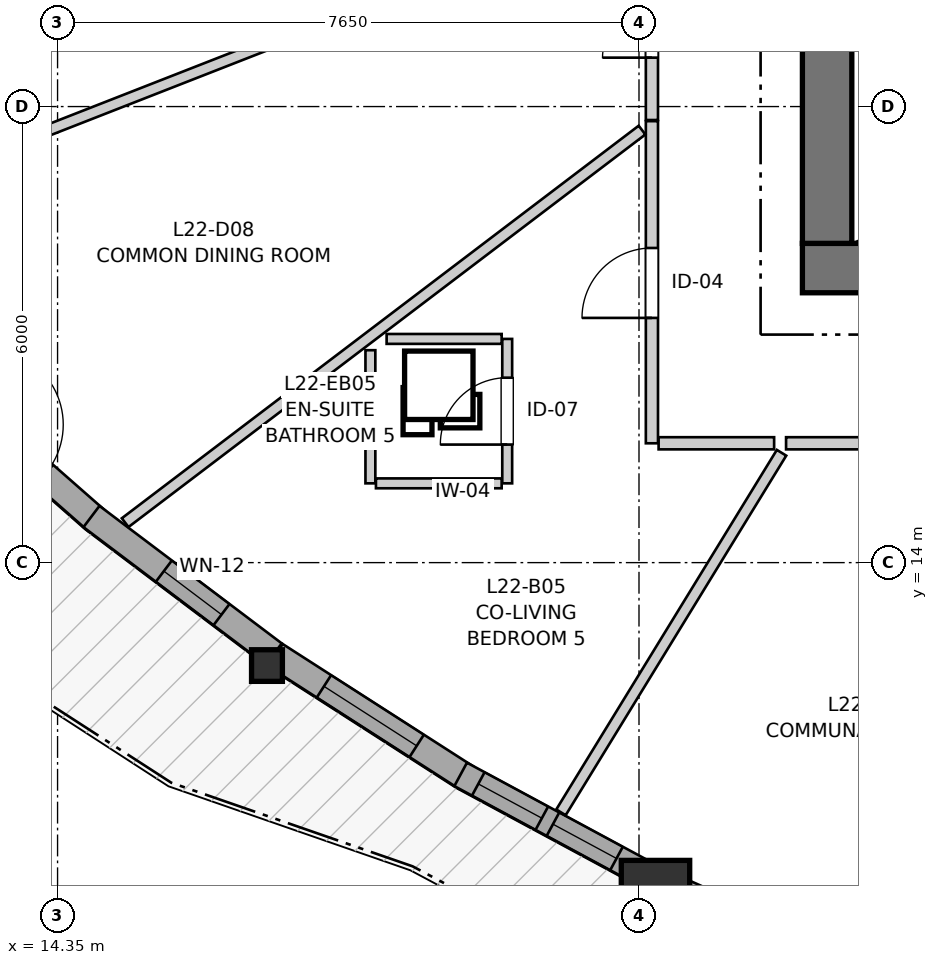
"""IFC4 building model, lengths in metres.
Left out: names, types, materials, properties, quantities, classifications, styles, units other than length and angle.
Written with IfcOpenShell. Run it as: python <this file> out.ifc"""

import sys

from ifc_helpers import new_model, si_unit, direction, frame, frame_2d, origin, origin_2d, place, context, subcontext, project, spatial, rectangle, i_section, extrude, source, transform, mapped, element, fill, save


model = new_model("IFC4")
c1 = context("Model", 3, precision=1e-05, world=origin(), true_north=direction((0.0, 1.0)))
c2 = subcontext(c1, "Body", "Model", "MODEL_VIEW")
j1 = project(units=[si_unit("LENGTHUNIT", "METRE"), si_unit("PLANEANGLEUNIT", "RADIAN")], contexts=[c1])
p1 = place(None, origin())
s1 = spatial("IfcSite", under=j1, at=p1, CompositionType="ELEMENT")
p2 = place(p1, origin())
s2 = spatial("IfcBuilding", under=s1, at=p2, CompositionType="ELEMENT")
p3 = place(p2, frame((0.0, 0.0, 76.8)))
s3 = spatial("IfcBuildingStorey", under=s2, at=p3, CompositionType="ELEMENT", Elevation=76.8)
p4 = place(p3, frame((24.15, 17.875, 0.0), z_axis=(0.0, 0.0, 1.0), x_axis=(1.0, 0.0, 0.0)))
e1 = element("IfcWall", 1, at=p4, inside=s3, PredefinedType="SHEAR", context=c2, shape_type="SweptSolid", body=[
    extrude(rectangle(XDim=12.4, YDim=0.65, at=frame_2d((6.2, 0.0))), origin(), (0.0, 0.0, 1.0), 2.935),
])
p5 = place(p3, frame((24.475, 33.8, 0.0), z_axis=(0.0, 0.0, 1.0), x_axis=(0.0, -1.0, 0.0)))
e2 = element("IfcWall", 2, at=p5, inside=s3, PredefinedType="SHEAR", context=c2, shape_type="SweptSolid", body=[
    extrude(rectangle(XDim=15.6, YDim=0.65, at=frame_2d((7.8, 0.0))), origin(), (0.0, 0.0, 1.0), 2.935),
])
p6 = place(p5, frame((7.05, 0.0, 0.0)))
e3 = element("IfcOpeningElement", 3, at=p6, cuts=e2, PredefinedType="OPENING", context=c2, shape_type="SweptSolid", body=[
    extrude(rectangle(XDim=1.5, YDim=2.15, at=frame_2d((0.75, 1.075))), frame((0.0, 0.335, 0.0), z_axis=(0.0, -1.0, 0.0), x_axis=(1.0, 0.0, 0.0)), (0.0, 0.0, 1.0), 0.67),
])
p7 = place(p5, frame((3.52, 0.0, 0.0)))
e4 = element("IfcOpeningElement", 4, at=p7, cuts=e2, PredefinedType="OPENING", context=c2, shape_type="SweptSolid", body=[
    extrude(rectangle(XDim=0.86, YDim=2.05, at=frame_2d((0.43, 1.025))), frame((0.0, 0.335, 0.0), z_axis=(0.0, -1.0, 0.0), x_axis=(1.0, 0.0, 0.0)), (0.0, 0.0, 1.0), 0.67),
])
p8 = place(p5, frame((11.22, 0.0, 0.0)))
e5 = element("IfcOpeningElement", 5, at=p8, cuts=e2, PredefinedType="OPENING", context=c2, shape_type="SweptSolid", body=[
    extrude(rectangle(XDim=0.86, YDim=2.05, at=frame_2d((0.43, 1.025))), frame((0.0, 0.335, 0.0), z_axis=(0.0, -1.0, 0.0), x_axis=(1.0, 0.0, 0.0)), (0.0, 0.0, 1.0), 0.67),
])
m1 = source(origin(), c2, "Body", "SweptSolid", [
    extrude(i_section(OverallWidth=0.406, OverallDepth=0.416, WebThickness=0.027, FlangeThickness=0.044, FilletRadius=0.015, at=origin_2d()), origin(), (0.0, 0.0, 1.0), 2.935),
])
p9 = place(p3, frame((17.105, 12.646, 0.0), z_axis=(0.0, 0.0, 1.0), x_axis=(1.0, 0.0, 0.0)))
e6 = element("IfcColumn", 6, at=p9, inside=s3, PredefinedType="PILASTER", context=c2, shape_type="MappedRepresentation", body=[
    mapped(m1, transform((0.0, 0.0, 0.0), x_axis=(1.0, 0.0, 0.0), y_axis=(0.0, 1.0, 0.0), z_axis=(0.0, 0.0, 1.0), scale=1.0)),
])
m2 = source(origin(), c2, "Body", "SweptSolid", [
    extrude(rectangle(XDim=0.9, YDim=0.9, at=origin_2d()), origin(), (0.0, 0.0, 1.0), 2.935),
])
p10 = place(p3, frame((22.217, 9.633, 0.0), z_axis=(0.0, 0.0, 1.0), x_axis=(1.0, 0.0, 0.0)))
e7 = element("IfcColumn", 7, at=p10, inside=s3, PredefinedType="COLUMN", context=c2, shape_type="MappedRepresentation", body=[
    mapped(m2, transform((0.0, 0.0, 0.0), x_axis=(1.0, 0.0, 0.0), y_axis=(0.0, 1.0, 0.0), z_axis=(0.0, 0.0, 1.0), scale=1.0)),
])
p11 = place(p3, frame((12.736, 16.419, 0.0), z_axis=(0.0, 0.0, 1.0), x_axis=(0.751507962483, -0.659724019818, 0.0)))
e8 = element("IfcWall", 8, at=p11, inside=s3, PredefinedType="SOLIDWALL", context=c2, shape_type="SweptSolid", body=[
    extrude(rectangle(XDim=2.833, YDim=0.35, at=frame_2d((1.417, 0.0))), origin(), (0.0, 0.0, 1.0), 2.465),
])
p12 = place(p11, frame((0.917, 0.0, 0.0)))
e9 = element("IfcOpeningElement", 9, at=p12, cuts=e8, PredefinedType="OPENING", context=c2, shape_type="SweptSolid", body=[
    extrude(rectangle(XDim=1.0, YDim=2.1, at=frame_2d((0.5, 1.05))), frame((0.0, 0.185, 0.0), z_axis=(0.0, -1.0, 0.0), x_axis=(1.0, 0.0, 0.0)), (0.0, 0.0, 1.0), 0.37),
])
p13 = place(p3, frame((14.796, 14.606, 0.0), z_axis=(0.0, 0.0, 1.0), x_axis=(0.79839776153, -0.602130396496, 0.0)))
e10 = element("IfcWall", 10, at=p13, inside=s3, PredefinedType="SOLIDWALL", context=c2, shape_type="SweptSolid", body=[
    extrude(rectangle(XDim=3.004, YDim=0.35, at=frame_2d((1.502, 0.0))), origin(), (0.0, 0.0, 1.0), 2.465),
])
p14 = place(p13, frame((1.193, 0.0, 0.82)))
e11 = element("IfcOpeningElement", 11, at=p14, cuts=e10, PredefinedType="OPENING", context=c2, shape_type="SweptSolid", body=[
    extrude(rectangle(XDim=0.95, YDim=1.35, at=frame_2d((0.475, 0.675))), frame((0.0, 0.185, 0.0), z_axis=(0.0, -1.0, 0.0), x_axis=(1.0, 0.0, 0.0)), (0.0, 0.0, 1.0), 0.37),
])
p15 = place(p3, frame((17.217, 12.782, 0.0), z_axis=(0.0, 0.0, 1.0), x_axis=(0.841568610443, -0.540150232729, 0.0)))
e12 = element("IfcWall", 12, at=p15, inside=s3, PredefinedType="SOLIDWALL", context=c2, shape_type="SweptSolid", body=[
    extrude(rectangle(XDim=2.987, YDim=0.35, at=frame_2d((1.494, 0.0))), origin(), (0.0, 0.0, 1.0), 2.465),
])
p16 = place(p15, frame((0.759, 0.0, 0.82)))
e13 = element("IfcOpeningElement", 13, at=p16, cuts=e12, PredefinedType="OPENING", context=c2, shape_type="SweptSolid", body=[
    extrude(rectangle(XDim=1.45, YDim=1.25, at=frame_2d((0.725, 0.625))), frame((0.0, 0.185, 0.0), z_axis=(0.0, -1.0, 0.0), x_axis=(1.0, 0.0, 0.0)), (0.0, 0.0, 1.0), 0.37),
])
p17 = place(p3, frame((19.654, 11.214, 0.0), z_axis=(0.0, 0.0, 1.0), x_axis=(0.880112978449, -0.474764304857, 0.0)))
e14 = element("IfcWall", 14, at=p17, inside=s3, PredefinedType="SOLIDWALL", context=c2, shape_type="SweptSolid", body=[
    extrude(rectangle(XDim=2.782, YDim=0.35, at=frame_2d((1.391, 0.0))), origin(), (0.0, 0.0, 1.0), 2.465),
])
p18 = place(p17, frame((0.264, 0.0, 0.82)))
e15 = element("IfcOpeningElement", 15, at=p18, cuts=e14, PredefinedType="OPENING", context=c2, shape_type="SweptSolid", body=[
    extrude(rectangle(XDim=0.95, YDim=1.35, at=frame_2d((0.475, 0.675))), frame((0.0, 0.185, 0.0), z_axis=(0.0, -1.0, 0.0), x_axis=(1.0, 0.0, 0.0)), (0.0, 0.0, 1.0), 0.37),
])
p19 = place(p17, frame((1.38, 0.0, 0.82)))
e16 = element("IfcOpeningElement", 16, at=p19, cuts=e14, PredefinedType="OPENING", context=c2, shape_type="SweptSolid", body=[
    extrude(rectangle(XDim=0.95, YDim=1.35, at=frame_2d((0.475, 0.675))), frame((0.0, 0.185, 0.0), z_axis=(0.0, -1.0, 0.0), x_axis=(1.0, 0.0, 0.0)), (0.0, 0.0, 1.0), 0.37),
])
p20 = place(p3, frame((22.494, 9.701, 0.0), z_axis=(0.0, 0.0, 1.0), x_axis=(0.913444316629, -0.406963733542, 0.0)))
e17 = element("IfcWall", 17, at=p20, inside=s3, PredefinedType="SOLIDWALL", context=c2, shape_type="SweptSolid", body=[
    extrude(rectangle(XDim=2.799, YDim=0.35, at=frame_2d((1.399, 0.0))), origin(), (0.0, 0.0, 1.0), 2.465),
])
p21 = place(p20, frame((0.669, 0.0, 0.82)))
e18 = element("IfcOpeningElement", 18, at=p21, cuts=e17, PredefinedType="OPENING", context=c2, shape_type="SweptSolid", body=[
    extrude(rectangle(XDim=1.45, YDim=1.25, at=frame_2d((0.725, 0.625))), frame((0.0, 0.185, 0.0), z_axis=(0.0, -1.0, 0.0), x_axis=(1.0, 0.0, 0.0)), (0.0, 0.0, 1.0), 0.37),
])
p22 = place(p3, frame((28.359, 15.57, 0.0), z_axis=(0.0, 0.0, 1.0), x_axis=(-1.0, 0.0, 0.0)))
e19 = element("IfcWall", 19, at=p22, inside=s3, PredefinedType="PARTITIONING", context=c2, shape_type="SweptSolid", body=[
    extrude(rectangle(XDim=4.424, YDim=0.16, at=frame_2d((2.212, 0.0))), origin(), (0.0, 0.0, 1.0), 2.935),
])
p23 = place(p22, frame((1.561, 0.0, 0.0)))
e20 = element("IfcOpeningElement", 20, at=p23, cuts=e19, PredefinedType="OPENING", context=c2, shape_type="SweptSolid", body=[
    extrude(rectangle(XDim=1.3, YDim=2.1, at=frame_2d((0.65, 1.05))), frame((0.0, 0.09, 0.0), z_axis=(0.0, -1.0, 0.0), x_axis=(1.0, 0.0, 0.0)), (0.0, 0.0, 1.0), 0.18),
])
p24 = place(p3, frame((22.17, 15.57, 0.0), z_axis=(0.0, 0.0, 1.0), x_axis=(0.0, 1.0, 0.0)))
e21 = element("IfcWall", 21, at=p24, inside=s3, PredefinedType="PARTITIONING", context=c2, shape_type="SweptSolid", body=[
    extrude(rectangle(XDim=4.238, YDim=0.16, at=frame_2d((2.119, 0.0))), origin(), (0.0, 0.0, 1.0), 2.935),
])
p25 = place(p24, frame((1.649, 0.0, 0.0)))
e22 = element("IfcOpeningElement", 22, at=p25, cuts=e21, PredefinedType="OPENING", context=c2, shape_type="SweptSolid", body=[
    extrude(rectangle(XDim=0.92, YDim=2.1, at=frame_2d((0.46, 1.05))), frame((0.0, 0.09, 0.0), z_axis=(0.0, -1.0, 0.0), x_axis=(1.0, 0.0, 0.0)), (0.0, 0.0, 1.0), 0.18),
])
p26 = place(p3, frame((22.17, 19.823, 0.0), z_axis=(0.0, 0.0, 1.0), x_axis=(0.0, 1.0, 0.0)))
e23 = element("IfcWall", 23, at=p26, inside=s3, PredefinedType="PARTITIONING", context=c2, shape_type="SweptSolid", body=[
    extrude(rectangle(XDim=2.991, YDim=0.16, at=frame_2d((1.496, 0.0))), origin(), (0.0, 0.0, 1.0), 2.935),
])
p27 = place(p26, frame((0.821, 0.0, 0.0)))
e24 = element("IfcOpeningElement", 24, at=p27, cuts=e23, PredefinedType="OPENING", context=c2, shape_type="SweptSolid", body=[
    extrude(rectangle(XDim=1.3, YDim=2.1, at=frame_2d((0.65, 1.05))), frame((0.0, 0.09, 0.0), z_axis=(0.0, -1.0, 0.0), x_axis=(1.0, 0.0, 0.0)), (0.0, 0.0, 1.0), 0.18),
])
p28 = place(p3, frame((20.266, 15.043, 0.0), z_axis=(0.0, 0.0, 1.0), x_axis=(0.0, 1.0, 0.0)))
e25 = element("IfcWall", 25, at=p28, inside=s3, PredefinedType="PARTITIONING", context=c2, shape_type="SweptSolid", body=[
    extrude(rectangle(XDim=1.9, YDim=0.13, at=frame_2d((0.95, 0.0))), origin(), (0.0, 0.0, 1.0), 2.935),
])
p29 = place(p28, frame((0.51, 0.0, 0.0)))
e26 = element("IfcOpeningElement", 26, at=p29, cuts=e25, PredefinedType="OPENING", context=c2, shape_type="SweptSolid", body=[
    extrude(rectangle(XDim=0.88, YDim=2.05, at=frame_2d((0.44, 1.025))), frame((0.0, 0.075, 0.0), z_axis=(0.0, -1.0, 0.0), x_axis=(1.0, 0.0, 0.0)), (0.0, 0.0, 1.0), 0.15),
])
p30 = place(p3, frame((10.998, 18.425, 0.0), z_axis=(0.0, 0.0, 1.0), x_axis=(0.931213049878, 0.364475315676, 0.0)))
e27 = element("IfcWall", 27, at=p30, inside=s3, PredefinedType="PARTITIONING", context=c2, shape_type="SweptSolid", body=[
    extrude(rectangle(XDim=11.875, YDim=0.145, at=frame_2d((5.938, 0.0))), origin(), (0.0, 0.0, 1.0), 2.935),
])
p31 = place(p3, frame((15.239, 14.526, 0.0), z_axis=(0.0, 0.0, 1.0), x_axis=(0.796393529077, 0.604778758592, 0.0)))
e28 = element("IfcWall", 28, at=p31, inside=s3, PredefinedType="PARTITIONING", context=c2, shape_type="SweptSolid", body=[
    extrude(rectangle(XDim=8.539, YDim=0.145, at=frame_2d((4.27, 0.0))), origin(), (0.0, 0.0, 1.0), 2.935),
])
p32 = place(p3, frame((20.973, 10.715, 0.0), z_axis=(0.0, 0.0, 1.0), x_axis=(0.522906546436, 0.852390018533, 0.0)))
e29 = element("IfcWall", 29, at=p32, inside=s3, PredefinedType="PARTITIONING", context=c2, shape_type="SweptSolid", body=[
    extrude(rectangle(XDim=5.55, YDim=0.145, at=frame_2d((2.775, 0.0))), origin(), (0.0, 0.0, 1.0), 2.935),
])
p33 = place(p3, frame((18.466, 15.043, 0.0), z_axis=(0.0, 0.0, 1.0), x_axis=(0.0, 1.0, 0.0)))
e30 = element("IfcWall", 30, at=p33, inside=s3, PredefinedType="PARTITIONING", context=c2, shape_type="SweptSolid", body=[
    extrude(rectangle(XDim=1.752, YDim=0.13, at=frame_2d((0.876, 0.0))), origin(), (0.0, 0.0, 1.0), 2.935),
])
p34 = place(p3, frame((18.679, 16.943, 0.0), z_axis=(0.0, 0.0, 1.0), x_axis=(1.0, 0.0, 0.0)))
e31 = element("IfcWall", 31, at=p34, inside=s3, PredefinedType="PARTITIONING", context=c2, shape_type="SweptSolid", body=[
    extrude(rectangle(XDim=1.514, YDim=0.13, at=frame_2d((0.757, 0.0))), origin(), (0.0, 0.0, 1.0), 2.935),
])
p35 = place(p3, frame((18.539, 15.043, 0.0), z_axis=(0.0, 0.0, 1.0), x_axis=(1.0, 0.0, 0.0)))
e32 = element("IfcWall", 32, at=p35, inside=s3, PredefinedType="PARTITIONING", context=c2, shape_type="SweptSolid", body=[
    extrude(rectangle(XDim=1.654, YDim=0.13, at=frame_2d((0.827, 0.0))), origin(), (0.0, 0.0, 1.0), 2.935),
])
p36 = place(p3, frame((22.258, 15.57, 0.0), z_axis=(0.0, 0.0, 1.0), x_axis=(1.0, 0.0, 0.0)))
e33 = element("IfcWall", 33, at=p36, inside=s3, PredefinedType="PARTITIONING", context=c2, shape_type="SweptSolid", body=[
    extrude(rectangle(XDim=1.52, YDim=0.16, at=frame_2d((0.76, 0.0))), origin(), (0.0, 0.0, 1.0), 2.935),
])
m3 = source(origin(), c2, "Body", "SweptSolid", [
    extrude(rectangle(XDim=0.95, YDim=1.35, at=frame_2d((0.475, 0.675))), frame((0.0, 0.03, 0.0), z_axis=(0.0, -1.0, 0.0), x_axis=(1.0, 0.0, 0.0)), (0.0, 0.0, 1.0), 0.06),
])
p37 = place(p14, origin())
e34 = element("IfcWindow", 34, at=p37, inside=s3, PartitioningType="SINGLE_PANEL", PredefinedType="WINDOW", context=c2, shape_type="MappedRepresentation", body=[
    mapped(m3, transform((0.0, 0.0, 0.0), x_axis=(1.0, 0.0, 0.0), y_axis=(0.0, 1.0, 0.0), z_axis=(0.0, 0.0, 1.0), scale=1.0)),
])
fill(e11, e34)
m4 = source(origin(), c2, "Body", "SweptSolid", [
    extrude(rectangle(XDim=1.45, YDim=1.25, at=frame_2d((0.725, 0.625))), frame((0.0, 0.03, 0.0), z_axis=(0.0, -1.0, 0.0), x_axis=(1.0, 0.0, 0.0)), (0.0, 0.0, 1.0), 0.06),
])
p38 = place(p16, origin())
e35 = element("IfcWindow", 35, at=p38, inside=s3, PartitioningType="SINGLE_PANEL", PredefinedType="WINDOW", context=c2, shape_type="MappedRepresentation", body=[
    mapped(m4, transform((0.0, 0.0, 0.0), x_axis=(1.0, 0.0, 0.0), y_axis=(0.0, 1.0, 0.0), z_axis=(0.0, 0.0, 1.0), scale=1.0)),
])
fill(e13, e35)
p39 = place(p18, origin())
e36 = element("IfcWindow", 36, at=p39, inside=s3, PartitioningType="SINGLE_PANEL", PredefinedType="WINDOW", context=c2, shape_type="MappedRepresentation", body=[
    mapped(m3, transform((0.0, 0.0, 0.0), x_axis=(1.0, 0.0, 0.0), y_axis=(0.0, 1.0, 0.0), z_axis=(0.0, 0.0, 1.0), scale=1.0)),
])
fill(e15, e36)
p40 = place(p19, origin())
e37 = element("IfcWindow", 37, at=p40, inside=s3, PartitioningType="SINGLE_PANEL", PredefinedType="WINDOW", context=c2, shape_type="MappedRepresentation", body=[
    mapped(m3, transform((0.0, 0.0, 0.0), x_axis=(1.0, 0.0, 0.0), y_axis=(0.0, 1.0, 0.0), z_axis=(0.0, 0.0, 1.0), scale=1.0)),
])
fill(e16, e37)
m5 = source(origin(), c2, "Body", "SweptSolid", [
    extrude(rectangle(XDim=0.92, YDim=2.1, at=frame_2d((0.46, 1.05))), frame((0.0, 0.025, 0.0), z_axis=(0.0, -1.0, 0.0), x_axis=(1.0, 0.0, 0.0)), (0.0, 0.0, 1.0), 0.05),
])
p41 = place(p25, origin())
e38 = element("IfcDoor", 38, at=p41, inside=s3, OperationType="SINGLE_SWING_LEFT", PredefinedType="DOOR", context=c2, shape_type="MappedRepresentation", body=[
    mapped(m5, transform((0.0, 0.0, 0.0), x_axis=(1.0, 0.0, 0.0), y_axis=(0.0, 1.0, 0.0), z_axis=(0.0, 0.0, 1.0), scale=1.0)),
])
fill(e22, e38)
m6 = source(origin(), c2, "Body", "SweptSolid", [
    extrude(rectangle(XDim=1.3, YDim=2.1, at=frame_2d((0.65, 1.05))), frame((0.0, 0.025, 0.0), z_axis=(0.0, -1.0, 0.0), x_axis=(1.0, 0.0, 0.0)), (0.0, 0.0, 1.0), 0.05),
])
p42 = place(p27, origin())
e39 = element("IfcDoor", 39, at=p42, inside=s3, OperationType="DOUBLE_DOOR_SINGLE_SWING", PredefinedType="DOOR", context=c2, shape_type="MappedRepresentation", body=[
    mapped(m6, transform((0.0, 0.0, 0.0), x_axis=(1.0, 0.0, 0.0), y_axis=(0.0, 1.0, 0.0), z_axis=(0.0, 0.0, 1.0), scale=1.0)),
])
fill(e24, e39)
m7 = source(origin(), c2, "Body", "SweptSolid", [
    extrude(rectangle(XDim=0.88, YDim=2.05, at=frame_2d((0.44, 1.025))), frame((0.0, 0.025, 0.0), z_axis=(0.0, -1.0, 0.0), x_axis=(1.0, 0.0, 0.0)), (0.0, 0.0, 1.0), 0.05),
])
p43 = place(p29, origin())
e40 = element("IfcDoor", 40, at=p43, inside=s3, OperationType="SINGLE_SWING_LEFT", PredefinedType="DOOR", context=c2, shape_type="MappedRepresentation", body=[
    mapped(m7, transform((0.0, 0.0, 0.0), x_axis=(1.0, 0.0, 0.0), y_axis=(0.0, 1.0, 0.0), z_axis=(0.0, 0.0, 1.0), scale=1.0)),
])
fill(e26, e40)
save(model, sys.argv[1])
